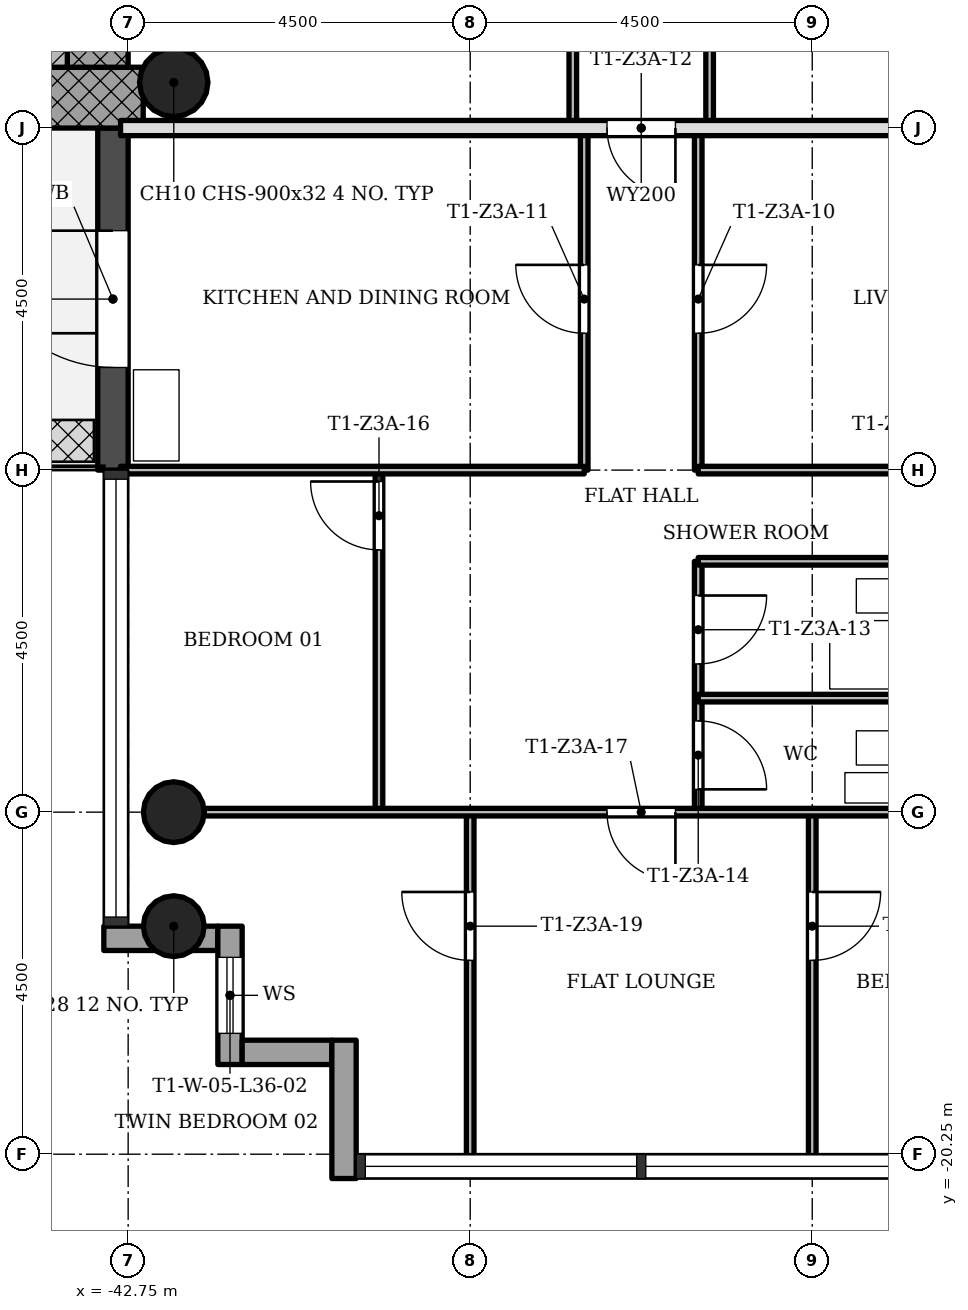
"""IFC4 building model, lengths in metres.
Left out: names, types, materials, properties, quantities, classifications, styles, units other than length and angle.
Written with IfcOpenShell. Run it as: python <this file> out.ifc"""

import sys

from ifc_helpers import new_model, si_unit, direction, frame, frame_2d, origin, origin_2d, place, context, subcontext, project, spatial, rectangle, hollow_circle, extrude, element, fill, save


model = new_model("IFC4")
c1 = context("Model", 3, precision=1e-05, world=origin(), true_north=direction((0.0, 1.0)))
c2 = subcontext(c1, "Body", "Model", "MODEL_VIEW")
j1 = project(units=[si_unit("LENGTHUNIT", "METRE"), si_unit("PLANEANGLEUNIT", "RADIAN")], contexts=[c1])
p1 = place(None, origin())
s1 = spatial("IfcSite", under=j1, at=p1, CompositionType="ELEMENT")
p2 = place(p1, origin())
s2 = spatial("IfcBuilding", under=s1, at=p2, CompositionType="ELEMENT")
p3 = place(p2, frame((0.0, 0.0, 133.7)))
s3 = spatial("IfcBuildingStorey", under=s2, at=p3, CompositionType="ELEMENT", Elevation=133.7)
p4 = place(p3, frame((-50.95, -6.35, 0.0), z_axis=(0.0, 0.0, 1.0), x_axis=(1.0, 0.0, 0.0)))
e1 = element("IfcWall", 1, at=p4, inside=s3, PredefinedType="SHEAR", context=c2, shape_type="SweptSolid", body=[
    extrude(rectangle(XDim=8.398, YDim=0.8, at=frame_2d((4.199, 0.0))), origin(), (0.0, 0.0, 1.0), 3.4),
])
p5 = place(p3, frame((-43.15, -5.95, 0.0), z_axis=(0.0, 0.0, 1.0), x_axis=(0.0, 1.0, 0.0)))
e2 = element("IfcWall", 2, at=p5, inside=s3, PredefinedType="SHEAR", context=c2, shape_type="SweptSolid", body=[
    extrude(rectangle(XDim=12.7, YDim=0.8, at=frame_2d((6.35, 0.0))), origin(), (0.0, 0.0, 1.0), 3.4),
])
p6 = place(p5, frame((5.05, 0.0, 0.0)))
e3 = element("IfcOpeningElement", 3, at=p6, cuts=e2, PredefinedType="OPENING", context=c2, shape_type="SweptSolid", body=[
    extrude(rectangle(XDim=1.8, YDim=2.1, at=frame_2d((0.9, 1.05))), frame((0.0, 0.41, 0.0), z_axis=(0.0, -1.0, 0.0), x_axis=(1.0, 0.0, 0.0)), (0.0, 0.0, 1.0), 0.82),
])
for number, where, z_axis, x_axis in (
    (4, (-42.15, -15.75, 0.0), (0.0, 0.0, 1.0), (1.0, 0.0, 0.0)),
    (5, (-42.15, -17.25, 0.0), (0.0, 0.0, 1.0), (1.0, 0.0, 0.0)),
):
    element("IfcColumn", number, at=place(p3, frame(where, z_axis=z_axis, x_axis=x_axis)), inside=s3, PredefinedType="COLUMN", context=c2, shape_type="SweptSolid", body=[
        extrude(hollow_circle(Radius=0.4, WallThickness=0.028, at=origin_2d()), origin(), (0.0, 0.0, 1.0), 3.4),
    ])
p7 = place(p3, frame((-42.15, -6.15, 0.0), z_axis=(0.0, 0.0, 1.0), x_axis=(1.0, 0.0, 0.0)))
e6 = element("IfcColumn", 6, at=p7, inside=s3, PredefinedType="COLUMN", context=c2, shape_type="SweptSolid", body=[
    extrude(hollow_circle(Radius=0.45, WallThickness=0.032, at=origin_2d()), origin(), (0.0, 0.0, 1.0), 3.4),
])
p8 = place(p3, frame((-42.95, -6.75, -0.02), z_axis=(0.0, 0.0, 1.0), x_axis=(0.0, -1.0, 0.0)))
e7 = element("IfcWall", 7, at=p8, inside=s3, PredefinedType="STANDARD", context=c2, shape_type="SweptSolid", body=[
    extrude(rectangle(XDim=4.5, YDim=0.4, at=frame_2d((2.25, 0.0))), origin(), (0.0, 0.0, 1.0), 3.12),
])
p9 = place(p8, frame((1.35, 0.0, 0.02)))
e8 = element("IfcOpeningElement", 8, at=p9, cuts=e7, PredefinedType="OPENING", context=c2, shape_type="SweptSolid", body=[
    extrude(rectangle(XDim=1.8, YDim=2.1, at=frame_2d((0.9, 1.05))), frame((0.0, 0.21, 0.0), z_axis=(0.0, -1.0, 0.0), x_axis=(1.0, 0.0, 0.0)), (0.0, 0.0, 1.0), 0.42),
])
p10 = place(p3, frame((-43.07, -17.41, -0.3), z_axis=(0.0, 0.0, 1.0), x_axis=(1.0, 0.0, 0.0)))
e9 = element("IfcWall", 9, at=p10, inside=s3, PredefinedType="STANDARD", context=c2, shape_type="SweptSolid", body=[
    extrude(rectangle(XDim=1.5, YDim=0.32, at=frame_2d((0.75, 0.0))), origin(), (0.0, 0.0, 1.0), 3.4),
])
p11 = place(p3, frame((-41.41, -17.25, -0.3), z_axis=(0.0, 0.0, 1.0), x_axis=(0.0, -1.0, 0.0)))
e10 = element("IfcWall", 10, at=p11, inside=s3, PredefinedType="STANDARD", context=c2, shape_type="SweptSolid", body=[
    extrude(rectangle(XDim=1.82, YDim=0.32, at=frame_2d((0.91, 0.0))), origin(), (0.0, 0.0, 1.0), 3.4),
])
p12 = place(p11, frame((0.41, 0.0, 1.2)))
e11 = element("IfcOpeningElement", 11, at=p12, cuts=e10, PredefinedType="OPENING", context=c2, shape_type="SweptSolid", body=[
    extrude(rectangle(XDim=1.0, YDim=1.5, at=frame_2d((0.5, 0.75))), frame((0.0, 0.17, 0.0), z_axis=(0.0, -1.0, 0.0), x_axis=(1.0, 0.0, 0.0)), (0.0, 0.0, 1.0), 0.34),
])
p13 = place(p3, frame((-41.25, -18.91, -0.3), z_axis=(0.0, 0.0, 1.0), x_axis=(1.0, 0.0, 0.0)))
e12 = element("IfcWall", 12, at=p13, inside=s3, PredefinedType="STANDARD", context=c2, shape_type="SweptSolid", body=[
    extrude(rectangle(XDim=1.18, YDim=0.32, at=frame_2d((0.59, 0.0))), origin(), (0.0, 0.0, 1.0), 3.4),
])
p14 = place(p3, frame((-39.91, -18.75, -0.3), z_axis=(0.0, 0.0, 1.0), x_axis=(0.0, -1.0, 0.0)))
e13 = element("IfcWall", 13, at=p14, inside=s3, PredefinedType="STANDARD", context=c2, shape_type="SweptSolid", body=[
    extrude(rectangle(XDim=1.82, YDim=0.32, at=frame_2d((0.91, 0.0))), origin(), (0.0, 0.0, 1.0), 3.4),
])
p15 = place(p3, frame((-39.45, -15.75, 0.0), z_axis=(0.0, 0.0, 1.0), x_axis=(0.0, 1.0, 0.0)))
e14 = element("IfcWall", 14, at=p15, inside=s3, PredefinedType="PARTITIONING", context=c2, shape_type="SweptSolid", body=[
    extrude(rectangle(XDim=4.5, YDim=0.1, at=frame_2d((2.25, 0.0))), origin(), (0.0, 0.0, 1.0), 3.0),
])
p16 = place(p15, frame((3.45, 0.0, 0.0)))
e15 = element("IfcOpeningElement", 15, at=p16, cuts=e14, PredefinedType="OPENING", context=c2, shape_type="SweptSolid", body=[
    extrude(rectangle(XDim=0.9, YDim=2.1, at=frame_2d((0.45, 1.05))), frame((0.0, 0.06, 0.0), z_axis=(0.0, -1.0, 0.0), x_axis=(1.0, 0.0, 0.0)), (0.0, 0.0, 1.0), 0.12),
])
p17 = place(p3, frame((-38.25, -20.35, 0.0), z_axis=(0.0, 0.0, 1.0), x_axis=(0.0, 1.0, 0.0)))
e16 = element("IfcWall", 16, at=p17, inside=s3, PredefinedType="PARTITIONING", context=c2, shape_type="SweptSolid", body=[
    extrude(rectangle(XDim=4.6, YDim=0.1, at=frame_2d((2.3, 0.0))), origin(), (0.0, 0.0, 1.0), 3.0),
])
p18 = place(p17, frame((2.65, 0.0, 0.0)))
e17 = element("IfcOpeningElement", 17, at=p18, cuts=e16, PredefinedType="OPENING", context=c2, shape_type="SweptSolid", body=[
    extrude(rectangle(XDim=0.9, YDim=2.1, at=frame_2d((0.45, 1.05))), frame((0.0, 0.06, 0.0), z_axis=(0.0, -1.0, 0.0), x_axis=(1.0, 0.0, 0.0)), (0.0, 0.0, 1.0), 0.12),
])
p19 = place(p3, frame((-36.9, -6.75, 0.0), z_axis=(0.0, 0.0, 1.0), x_axis=(0.0, 1.0, 0.0)))
e18 = element("IfcWall", 18, at=p19, inside=s3, PredefinedType="PARTITIONING", context=c2, shape_type="SweptSolid", body=[
    extrude(rectangle(XDim=2.25, YDim=0.1, at=frame_2d((1.125, 0.0))), origin(), (0.0, 0.0, 1.0), 3.0),
])
p20 = place(p3, frame((-36.75, -11.25, 0.0), z_axis=(0.0, 0.0, 1.0), x_axis=(0.0, 1.0, 0.0)))
e19 = element("IfcWall", 19, at=p20, inside=s3, PredefinedType="PARTITIONING", context=c2, shape_type="SweptSolid", body=[
    extrude(rectangle(XDim=4.5, YDim=0.1, at=frame_2d((2.25, 0.0))), origin(), (0.0, 0.0, 1.0), 3.0),
])
p21 = place(p20, frame((1.8, 0.0, 0.0)))
e20 = element("IfcOpeningElement", 20, at=p21, cuts=e19, PredefinedType="OPENING", context=c2, shape_type="SweptSolid", body=[
    extrude(rectangle(XDim=0.9, YDim=2.1, at=frame_2d((0.45, 1.05))), frame((0.0, 0.06, 0.0), z_axis=(0.0, -1.0, 0.0), x_axis=(1.0, 0.0, 0.0)), (0.0, 0.0, 1.0), 0.12),
])
p22 = place(p3, frame((-35.25, -15.75, 0.0), z_axis=(0.0, 0.0, 1.0), x_axis=(0.0, 1.0, 0.0)))
e21 = element("IfcWall", 21, at=p22, inside=s3, PredefinedType="PARTITIONING", context=c2, shape_type="SweptSolid", body=[
    extrude(rectangle(XDim=3.3, YDim=0.1, at=frame_2d((1.65, 0.0))), origin(), (0.0, 0.0, 1.0), 3.0),
])
p23 = place(p22, frame((1.95, 0.0, 0.0)))
e22 = element("IfcOpeningElement", 22, at=p23, cuts=e21, PredefinedType="OPENING", context=c2, shape_type="SweptSolid", body=[
    extrude(rectangle(XDim=0.9, YDim=2.1, at=frame_2d((0.45, 1.05))), frame((0.0, 0.06, 0.0), z_axis=(0.0, -1.0, 0.0), x_axis=(1.0, 0.0, 0.0)), (0.0, 0.0, 1.0), 0.12),
])
p24 = place(p22, frame((0.3, 0.0, 0.0)))
e23 = element("IfcOpeningElement", 23, at=p24, cuts=e21, PredefinedType="OPENING", context=c2, shape_type="SweptSolid", body=[
    extrude(rectangle(XDim=0.9, YDim=2.1, at=frame_2d((0.45, 1.05))), frame((0.0, 0.06, 0.0), z_axis=(0.0, -1.0, 0.0), x_axis=(1.0, 0.0, 0.0)), (0.0, 0.0, 1.0), 0.12),
])
p25 = place(p3, frame((-35.25, -11.25, 0.0), z_axis=(0.0, 0.0, 1.0), x_axis=(0.0, 1.0, 0.0)))
e24 = element("IfcWall", 24, at=p25, inside=s3, PredefinedType="PARTITIONING", context=c2, shape_type="SweptSolid", body=[
    extrude(rectangle(XDim=4.5, YDim=0.1, at=frame_2d((2.25, 0.0))), origin(), (0.0, 0.0, 1.0), 3.0),
])
p26 = place(p25, frame((1.8, 0.0, 0.0)))
e25 = element("IfcOpeningElement", 25, at=p26, cuts=e24, PredefinedType="OPENING", context=c2, shape_type="SweptSolid", body=[
    extrude(rectangle(XDim=0.9, YDim=2.1, at=frame_2d((0.45, 1.05))), frame((0.0, 0.06, 0.0), z_axis=(0.0, -1.0, 0.0), x_axis=(1.0, 0.0, 0.0)), (0.0, 0.0, 1.0), 0.12),
])
p27 = place(p3, frame((-35.1, -6.75, 0.0), z_axis=(0.0, 0.0, 1.0), x_axis=(0.0, 1.0, 0.0)))
e26 = element("IfcWall", 26, at=p27, inside=s3, PredefinedType="PARTITIONING", context=c2, shape_type="SweptSolid", body=[
    extrude(rectangle(XDim=2.25, YDim=0.1, at=frame_2d((1.125, 0.0))), origin(), (0.0, 0.0, 1.0), 3.0),
])
p28 = place(p3, frame((-33.75, -20.35, 0.0), z_axis=(0.0, 0.0, 1.0), x_axis=(0.0, 1.0, 0.0)))
e27 = element("IfcWall", 27, at=p28, inside=s3, PredefinedType="PARTITIONING", context=c2, shape_type="SweptSolid", body=[
    extrude(rectangle(XDim=4.6, YDim=0.1, at=frame_2d((2.3, 0.0))), origin(), (0.0, 0.0, 1.0), 3.0),
])
p29 = place(p28, frame((2.65, 0.0, 0.0)))
e28 = element("IfcOpeningElement", 28, at=p29, cuts=e27, PredefinedType="OPENING", context=c2, shape_type="SweptSolid", body=[
    extrude(rectangle(XDim=0.9, YDim=2.1, at=frame_2d((0.45, 1.05))), frame((0.0, 0.06, 0.0), z_axis=(0.0, -1.0, 0.0), x_axis=(1.0, 0.0, 0.0)), (0.0, 0.0, 1.0), 0.12),
])
p30 = place(p3, frame((-41.75, -15.75, 0.0), z_axis=(0.0, 0.0, 1.0), x_axis=(1.0, 0.0, 0.0)))
e29 = element("IfcWall", 29, at=p30, inside=s3, PredefinedType="PARTITIONING", context=c2, shape_type="SweptSolid", body=[
    extrude(rectangle(XDim=11.5, YDim=0.1, at=frame_2d((5.75, 0.0))), origin(), (0.0, 0.0, 1.0), 3.0),
])
p31 = place(p30, frame((5.3, 0.0, 0.0)))
e30 = element("IfcOpeningElement", 30, at=p31, cuts=e29, PredefinedType="OPENING", context=c2, shape_type="SweptSolid", body=[
    extrude(rectangle(XDim=0.9, YDim=2.1, at=frame_2d((0.45, 1.05))), frame((0.0, 0.06, 0.0), z_axis=(0.0, -1.0, 0.0), x_axis=(1.0, 0.0, 0.0)), (0.0, 0.0, 1.0), 0.12),
])
for number, where, z_axis, x_axis in (
    (31, (-35.25, -14.25, 0.0), (0.0, 0.0, 1.0), (1.0, 0.0, 0.0)),
    (32, (-35.25, -12.45, 0.0), (0.0, 0.0, 1.0), (1.0, 0.0, 0.0)),
):
    element("IfcWall", number, at=place(p3, frame(where, z_axis=z_axis, x_axis=x_axis)), inside=s3, PredefinedType="PARTITIONING", context=c2, shape_type="SweptSolid", body=[
        extrude(rectangle(XDim=2.7, YDim=0.1, at=frame_2d((1.35, 0.0))), origin(), (0.0, 0.0, 1.0), 3.0),
    ])
for number, where, z_axis, x_axis in (
    (33, (-42.85, -11.25, 0.0), (0.0, 0.0, 1.0), (1.0, 0.0, 0.0)),
    (34, (-35.25, -11.25, 0.0), (0.0, 0.0, 1.0), (1.0, 0.0, 0.0)),
):
    element("IfcWall", number, at=place(p3, frame(where, z_axis=z_axis, x_axis=x_axis)), inside=s3, PredefinedType="PARTITIONING", context=c2, shape_type="SweptSolid", body=[
        extrude(rectangle(XDim=6.1, YDim=0.1, at=frame_2d((3.05, 0.0))), origin(), (0.0, 0.0, 1.0), 3.0),
    ])
p32 = place(p3, frame((-42.85, -6.75, 0.0), z_axis=(0.0, 0.0, 1.0), x_axis=(1.0, 0.0, 0.0)))
e35 = element("IfcWall", 35, at=p32, inside=s3, PredefinedType="SOLIDWALL", context=c2, shape_type="SweptSolid", body=[
    extrude(rectangle(XDim=13.7, YDim=0.2, at=frame_2d((6.85, 0.0))), origin(), (0.0, 0.0, 1.0), 3.0),
])
p33 = place(p32, frame((6.4, 0.0, 0.0)))
e36 = element("IfcOpeningElement", 36, at=p33, cuts=e35, PredefinedType="OPENING", context=c2, shape_type="SweptSolid", body=[
    extrude(rectangle(XDim=0.9, YDim=2.1, at=frame_2d((0.45, 1.05))), frame((0.0, 0.11, 0.0), z_axis=(0.0, -1.0, 0.0), x_axis=(1.0, 0.0, 0.0)), (0.0, 0.0, 1.0), 0.22),
])
p34 = place(p3, frame((-43.75, -1.85, 0.0), z_axis=(0.0, 0.0, 1.0), x_axis=(0.0, -1.0, 0.0)))
e37 = element("IfcWall", 37, at=p34, inside=s3, PredefinedType="SHEAR", context=c2, shape_type="SweptSolid", body=[
    extrude(rectangle(XDim=4.1, YDim=0.4, at=frame_2d((2.05, 0.0))), origin(), (0.0, 0.0, 1.0), 3.4),
])
p35 = place(p9, origin())
e38 = element("IfcDoor", 38, at=p35, inside=s3, OperationType="SINGLE_SWING_LEFT", PredefinedType="DOOR", context=c2, shape_type="SweptSolid", body=[
    extrude(rectangle(XDim=1.8, YDim=2.1, at=frame_2d((0.9, 1.05))), frame((0.0, 0.025, 0.0), z_axis=(0.0, -1.0, 0.0), x_axis=(1.0, 0.0, 0.0)), (0.0, 0.0, 1.0), 0.05),
])
fill(e8, e38)
p36 = place(p26, origin())
e39 = element("IfcDoor", 39, at=p36, inside=s3, OperationType="SINGLE_SWING_RIGHT", PredefinedType="DOOR", context=c2, shape_type="SweptSolid", body=[
    extrude(rectangle(XDim=0.9, YDim=2.1, at=frame_2d((0.45, 1.05))), frame((0.0, 0.025, 0.0), z_axis=(0.0, -1.0, 0.0), x_axis=(1.0, 0.0, 0.0)), (0.0, 0.0, 1.0), 0.05),
])
fill(e25, e39)
p37 = place(p21, origin())
e40 = element("IfcDoor", 40, at=p37, inside=s3, OperationType="SINGLE_SWING_LEFT", PredefinedType="DOOR", context=c2, shape_type="SweptSolid", body=[
    extrude(rectangle(XDim=0.9, YDim=2.1, at=frame_2d((0.45, 1.05))), frame((0.0, 0.025, 0.0), z_axis=(0.0, -1.0, 0.0), x_axis=(1.0, 0.0, 0.0)), (0.0, 0.0, 1.0), 0.05),
])
fill(e20, e40)
p38 = place(p33, origin())
e41 = element("IfcDoor", 41, at=p38, inside=s3, OperationType="SINGLE_SWING_RIGHT", PredefinedType="DOOR", context=c2, shape_type="SweptSolid", body=[
    extrude(rectangle(XDim=0.9, YDim=2.1, at=frame_2d((0.45, 1.05))), frame((0.0, 0.025, 0.0), z_axis=(0.0, -1.0, 0.0), x_axis=(1.0, 0.0, 0.0)), (0.0, 0.0, 1.0), 0.05),
])
fill(e36, e41)
p39 = place(p23, origin())
e42 = element("IfcDoor", 42, at=p39, inside=s3, OperationType="SINGLE_SWING_RIGHT", PredefinedType="DOOR", context=c2, shape_type="SweptSolid", body=[
    extrude(rectangle(XDim=0.9, YDim=2.1, at=frame_2d((0.45, 1.05))), frame((0.0, 0.025, 0.0), z_axis=(0.0, -1.0, 0.0), x_axis=(1.0, 0.0, 0.0)), (0.0, 0.0, 1.0), 0.05),
])
fill(e22, e42)
p40 = place(p24, origin())
e43 = element("IfcDoor", 43, at=p40, inside=s3, OperationType="SINGLE_SWING_LEFT", PredefinedType="DOOR", context=c2, shape_type="SweptSolid", body=[
    extrude(rectangle(XDim=0.9, YDim=2.1, at=frame_2d((0.45, 1.05))), frame((0.0, 0.025, 0.0), z_axis=(0.0, -1.0, 0.0), x_axis=(1.0, 0.0, 0.0)), (0.0, 0.0, 1.0), 0.05),
])
fill(e23, e43)
p41 = place(p16, origin())
e44 = element("IfcDoor", 44, at=p41, inside=s3, OperationType="SINGLE_SWING_LEFT", PredefinedType="DOOR", context=c2, shape_type="SweptSolid", body=[
    extrude(rectangle(XDim=0.9, YDim=2.1, at=frame_2d((0.45, 1.05))), frame((0.0, 0.025, 0.0), z_axis=(0.0, -1.0, 0.0), x_axis=(1.0, 0.0, 0.0)), (0.0, 0.0, 1.0), 0.05),
])
fill(e15, e44)
p42 = place(p31, origin())
e45 = element("IfcDoor", 45, at=p42, inside=s3, OperationType="SINGLE_SWING_RIGHT", PredefinedType="DOOR", context=c2, shape_type="SweptSolid", body=[
    extrude(rectangle(XDim=0.9, YDim=2.1, at=frame_2d((0.45, 1.05))), frame((0.0, 0.025, 0.0), z_axis=(0.0, -1.0, 0.0), x_axis=(1.0, 0.0, 0.0)), (0.0, 0.0, 1.0), 0.05),
])
fill(e30, e45)
p43 = place(p29, origin())
e46 = element("IfcDoor", 46, at=p43, inside=s3, OperationType="SINGLE_SWING_RIGHT", PredefinedType="DOOR", context=c2, shape_type="SweptSolid", body=[
    extrude(rectangle(XDim=0.9, YDim=2.1, at=frame_2d((0.45, 1.05))), frame((0.0, 0.025, 0.0), z_axis=(0.0, -1.0, 0.0), x_axis=(1.0, 0.0, 0.0)), (0.0, 0.0, 1.0), 0.05),
])
fill(e28, e46)
p44 = place(p18, origin())
e47 = element("IfcDoor", 47, at=p44, inside=s3, OperationType="SINGLE_SWING_LEFT", PredefinedType="DOOR", context=c2, shape_type="SweptSolid", body=[
    extrude(rectangle(XDim=0.9, YDim=2.1, at=frame_2d((0.45, 1.05))), frame((0.0, 0.025, 0.0), z_axis=(0.0, -1.0, 0.0), x_axis=(1.0, 0.0, 0.0)), (0.0, 0.0, 1.0), 0.05),
])
fill(e17, e47)
p45 = place(p12, origin())
e48 = element("IfcWindow", 48, at=p45, inside=s3, PartitioningType="SINGLE_PANEL", PredefinedType="WINDOW", context=c2, shape_type="SweptSolid", body=[
    extrude(rectangle(XDim=1.0, YDim=1.5, at=frame_2d((0.5, 0.75))), frame((0.0, 0.03, 0.0), z_axis=(0.0, -1.0, 0.0), x_axis=(1.0, 0.0, 0.0)), (0.0, 0.0, 1.0), 0.06),
])
fill(e11, e48)
save(model, sys.argv[1])
